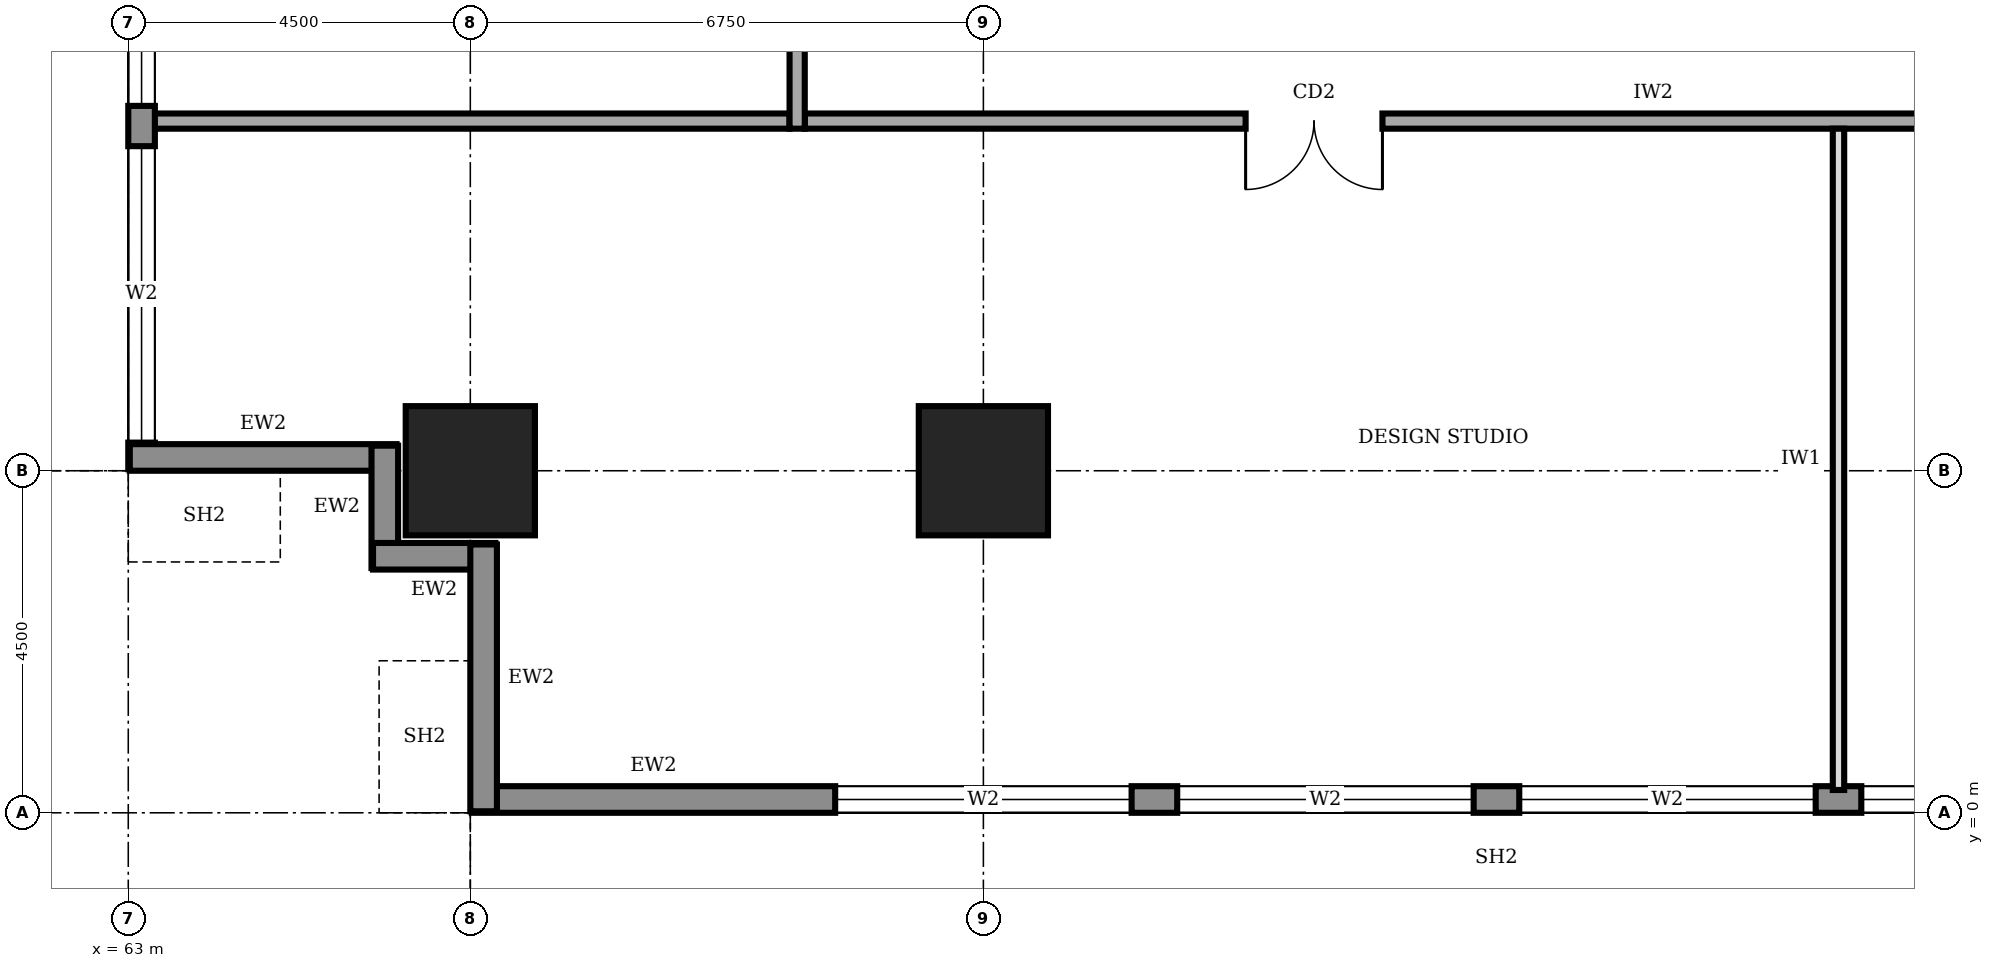
"""IFC4 building model, lengths in metres.
Left out: names, types, materials, properties, quantities, classifications, styles, units other than length and angle.
Written with IfcOpenShell. Run it as: python <this file> out.ifc"""

import sys

from ifc_helpers import new_model, si_unit, direction, frame, frame_2d, origin, origin_2d, place, context, subcontext, project, spatial, rectangle, extrude, element, fill, save


model = new_model("IFC4")
c1 = context("Model", 3, precision=1e-05, world=origin(), true_north=direction((0.0, 1.0)))
c2 = subcontext(c1, "Body", "Model", "MODEL_VIEW")
j1 = project(units=[si_unit("LENGTHUNIT", "METRE"), si_unit("PLANEANGLEUNIT", "RADIAN")], contexts=[c1])
p1 = place(None, origin())
s1 = spatial("IfcSite", under=j1, at=p1, CompositionType="ELEMENT")
p2 = place(p1, origin())
s2 = spatial("IfcBuilding", under=s1, at=p2, CompositionType="ELEMENT")
p3 = place(p2, frame((0.0, 0.0, 57.0)))
s3 = spatial("IfcBuildingStorey", under=s2, at=p3, CompositionType="ELEMENT", Elevation=57.0)
for number, where, z_axis, x_axis in (
    (1, (67.5, 4.5, 0.0), (0.0, 0.0, 1.0), (1.0, 0.0, 0.0)),
    (2, (74.25, 4.5, 0.0), (0.0, 0.0, 1.0), (1.0, 0.0, 0.0)),
):
    element("IfcColumn", number, at=place(p3, frame(where, z_axis=z_axis, x_axis=x_axis)), inside=s3, PredefinedType="COLUMN", context=c2, shape_type="SweptSolid", body=[
        extrude(rectangle(XDim=1.7, YDim=1.7, at=origin_2d()), origin(), (0.0, 0.0, 1.0), 4.0),
    ])
p4 = place(p3, frame((67.52, 0.175, 0.0), z_axis=(0.0, 0.0, 1.0), x_axis=(1.0, 0.0, 0.0)))
e3 = element("IfcWall", 3, at=p4, inside=s3, PredefinedType="STANDARD", context=c2, shape_type="SweptSolid", body=[
    extrude(rectangle(XDim=26.96, YDim=0.35, at=frame_2d((13.48, 0.0))), origin(), (0.0, 0.0, 1.0), 3.75),
])
p5 = place(p4, frame((4.78, 0.0, 0.6)))
e4 = element("IfcOpeningElement", 4, at=p5, cuts=e3, PredefinedType="OPENING", context=c2, shape_type="SweptSolid", body=[
    extrude(rectangle(XDim=3.9, YDim=2.6, at=frame_2d((1.95, 1.3))), frame((0.0, 0.185, 0.0), z_axis=(0.0, -1.0, 0.0), x_axis=(1.0, 0.0, 0.0)), (0.0, 0.0, 1.0), 0.37),
])
p6 = place(p4, frame((9.28, 0.0, 0.6)))
e5 = element("IfcOpeningElement", 5, at=p6, cuts=e3, PredefinedType="OPENING", context=c2, shape_type="SweptSolid", body=[
    extrude(rectangle(XDim=3.9, YDim=2.6, at=frame_2d((1.95, 1.3))), frame((0.0, 0.185, 0.0), z_axis=(0.0, -1.0, 0.0), x_axis=(1.0, 0.0, 0.0)), (0.0, 0.0, 1.0), 0.37),
])
p7 = place(p4, frame((13.78, 0.0, 0.6)))
e6 = element("IfcOpeningElement", 6, at=p7, cuts=e3, PredefinedType="OPENING", context=c2, shape_type="SweptSolid", body=[
    extrude(rectangle(XDim=3.9, YDim=2.6, at=frame_2d((1.95, 1.3))), frame((0.0, 0.185, 0.0), z_axis=(0.0, -1.0, 0.0), x_axis=(1.0, 0.0, 0.0)), (0.0, 0.0, 1.0), 0.37),
])
p8 = place(p4, frame((18.28, 0.0, 0.6)))
e7 = element("IfcOpeningElement", 7, at=p8, cuts=e3, PredefinedType="OPENING", context=c2, shape_type="SweptSolid", body=[
    extrude(rectangle(XDim=3.9, YDim=2.6, at=frame_2d((1.95, 1.3))), frame((0.0, 0.185, 0.0), z_axis=(0.0, -1.0, 0.0), x_axis=(1.0, 0.0, 0.0)), (0.0, 0.0, 1.0), 0.37),
])
p9 = place(p4, frame((22.71, 0.0, 0.6)))
e8 = element("IfcOpeningElement", 8, at=p9, cuts=e3, PredefinedType="OPENING", context=c2, shape_type="SweptSolid", body=[
    extrude(rectangle(XDim=3.9, YDim=2.6, at=frame_2d((1.95, 1.3))), frame((0.0, 0.185, 0.0), z_axis=(0.0, -1.0, 0.0), x_axis=(1.0, 0.0, 0.0)), (0.0, 0.0, 1.0), 0.37),
])
p10 = place(p3, frame((63.175, 35.98, 0.0), z_axis=(0.0, 0.0, 1.0), x_axis=(0.0, -1.0, 0.0)))
e9 = element("IfcWall", 9, at=p10, inside=s3, PredefinedType="STANDARD", context=c2, shape_type="SweptSolid", body=[
    extrude(rectangle(XDim=31.46, YDim=0.35, at=frame_2d((15.73, 0.0))), origin(), (0.0, 0.0, 1.0), 3.75),
])
p11 = place(p10, frame((27.21, 0.0, 0.6)))
e10 = element("IfcOpeningElement", 10, at=p11, cuts=e9, PredefinedType="OPENING", context=c2, shape_type="SweptSolid", body=[
    extrude(rectangle(XDim=3.9, YDim=2.6, at=frame_2d((1.95, 1.3))), frame((0.0, 0.185, 0.0), z_axis=(0.0, -1.0, 0.0), x_axis=(1.0, 0.0, 0.0)), (0.0, 0.0, 1.0), 0.37),
])
p12 = place(p10, frame((22.78, 0.0, 0.6)))
e11 = element("IfcOpeningElement", 11, at=p12, cuts=e9, PredefinedType="OPENING", context=c2, shape_type="SweptSolid", body=[
    extrude(rectangle(XDim=3.9, YDim=2.6, at=frame_2d((1.95, 1.3))), frame((0.0, 0.185, 0.0), z_axis=(0.0, -1.0, 0.0), x_axis=(1.0, 0.0, 0.0)), (0.0, 0.0, 1.0), 0.37),
])
p13 = place(p10, frame((18.28, 0.0, 0.6)))
e12 = element("IfcOpeningElement", 12, at=p13, cuts=e9, PredefinedType="OPENING", context=c2, shape_type="SweptSolid", body=[
    extrude(rectangle(XDim=3.9, YDim=2.6, at=frame_2d((1.95, 1.3))), frame((0.0, 0.185, 0.0), z_axis=(0.0, -1.0, 0.0), x_axis=(1.0, 0.0, 0.0)), (0.0, 0.0, 1.0), 0.37),
])
p14 = place(p10, frame((13.78, 0.0, 0.6)))
e13 = element("IfcOpeningElement", 13, at=p14, cuts=e9, PredefinedType="OPENING", context=c2, shape_type="SweptSolid", body=[
    extrude(rectangle(XDim=3.9, YDim=2.6, at=frame_2d((1.95, 1.3))), frame((0.0, 0.185, 0.0), z_axis=(0.0, -1.0, 0.0), x_axis=(1.0, 0.0, 0.0)), (0.0, 0.0, 1.0), 0.37),
])
p15 = place(p10, frame((9.28, 0.0, 0.6)))
e14 = element("IfcOpeningElement", 14, at=p15, cuts=e9, PredefinedType="OPENING", context=c2, shape_type="SweptSolid", body=[
    extrude(rectangle(XDim=3.9, YDim=2.6, at=frame_2d((1.95, 1.3))), frame((0.0, 0.185, 0.0), z_axis=(0.0, -1.0, 0.0), x_axis=(1.0, 0.0, 0.0)), (0.0, 0.0, 1.0), 0.37),
])
p16 = place(p10, frame((4.78, 0.0, 0.6)))
e15 = element("IfcOpeningElement", 15, at=p16, cuts=e9, PredefinedType="OPENING", context=c2, shape_type="SweptSolid", body=[
    extrude(rectangle(XDim=3.9, YDim=2.6, at=frame_2d((1.95, 1.3))), frame((0.0, 0.185, 0.0), z_axis=(0.0, -1.0, 0.0), x_axis=(1.0, 0.0, 0.0)), (0.0, 0.0, 1.0), 0.37),
])
p17 = place(p3, frame((63.02, 4.675, 0.0), z_axis=(0.0, 0.0, 1.0), x_axis=(1.0, 0.0, 0.0)))
e16 = element("IfcWall", 16, at=p17, inside=s3, PredefinedType="STANDARD", context=c2, shape_type="SweptSolid", body=[
    extrude(rectangle(XDim=3.51, YDim=0.35, at=frame_2d((1.755, 0.0))), origin(), (0.0, 0.0, 1.0), 2.85),
])
for number, where, z_axis, x_axis in (
    (17, (66.375, 4.83, 0.0), (0.0, 0.0, 1.0), (0.0, -1.0, 0.0)),
    (18, (66.22, 3.375, 0.0), (0.0, 0.0, 1.0), (1.0, 0.0, 0.0)),
):
    element("IfcWall", number, at=place(p3, frame(where, z_axis=z_axis, x_axis=x_axis)), inside=s3, PredefinedType="STANDARD", context=c2, shape_type="SweptSolid", body=[
        extrude(rectangle(XDim=1.61, YDim=0.35, at=frame_2d((0.805, 0.0))), origin(), (0.0, 0.0, 1.0), 3.75),
    ])
p18 = place(p3, frame((67.675, 3.53, 0.0), z_axis=(0.0, 0.0, 1.0), x_axis=(0.0, -1.0, 0.0)))
e19 = element("IfcWall", 19, at=p18, inside=s3, PredefinedType="STANDARD", context=c2, shape_type="SweptSolid", body=[
    extrude(rectangle(XDim=3.51, YDim=0.35, at=frame_2d((1.755, 0.0))), origin(), (0.0, 0.0, 1.0), 2.85),
])
p19 = place(p3, frame((71.9, 9.1, 0.0), z_axis=(0.0, 0.0, 1.0), x_axis=(1.0, 0.0, 0.0)))
e20 = element("IfcWall", 20, at=p19, inside=s3, PredefinedType="SOLIDWALL", context=c2, shape_type="SweptSolid", body=[
    extrude(rectangle(XDim=17.65, YDim=0.2, at=frame_2d((8.825, 0.0))), origin(), (0.0, 0.0, 1.0), 3.75),
])
p20 = place(p19, frame((5.8, 0.0, 0.0)))
e21 = element("IfcOpeningElement", 21, at=p20, cuts=e20, PredefinedType="OPENING", context=c2, shape_type="SweptSolid", body=[
    extrude(rectangle(XDim=1.8, YDim=2.1, at=frame_2d((0.9, 1.05))), frame((0.0, 0.11, 0.0), z_axis=(0.0, -1.0, 0.0), x_axis=(1.0, 0.0, 0.0)), (0.0, 0.0, 1.0), 0.22),
])
p21 = place(p19, frame((14.725, 0.0, 0.0)))
e22 = element("IfcOpeningElement", 22, at=p21, cuts=e20, PredefinedType="OPENING", context=c2, shape_type="SweptSolid", body=[
    extrude(rectangle(XDim=1.8, YDim=2.1, at=frame_2d((0.9, 1.05))), frame((0.0, 0.11, 0.0), z_axis=(0.0, -1.0, 0.0), x_axis=(1.0, 0.0, 0.0)), (0.0, 0.0, 1.0), 0.22),
])
p22 = place(p3, frame((71.8, 32.05, 0.0), z_axis=(0.0, 0.0, 1.0), x_axis=(0.0, -1.0, 0.0)))
e23 = element("IfcWall", 23, at=p22, inside=s3, PredefinedType="SOLIDWALL", context=c2, shape_type="SweptSolid", body=[
    extrude(rectangle(XDim=23.05, YDim=0.2, at=frame_2d((11.525, 0.0))), origin(), (0.0, 0.0, 1.0), 3.75),
])
p23 = place(p22, frame((18.05, 0.0, 0.0)))
e24 = element("IfcOpeningElement", 24, at=p23, cuts=e23, PredefinedType="OPENING", context=c2, shape_type="SweptSolid", body=[
    extrude(rectangle(XDim=1.0, YDim=2.1, at=frame_2d((0.5, 1.05))), frame((0.0, 0.11, 0.0), z_axis=(0.0, -1.0, 0.0), x_axis=(1.0, 0.0, 0.0)), (0.0, 0.0, 1.0), 0.22),
])
p24 = place(p22, frame((11.3, 0.0, 0.0)))
e25 = element("IfcOpeningElement", 25, at=p24, cuts=e23, PredefinedType="OPENING", context=c2, shape_type="SweptSolid", body=[
    extrude(rectangle(XDim=1.0, YDim=2.1, at=frame_2d((0.5, 1.05))), frame((0.0, 0.11, 0.0), z_axis=(0.0, -1.0, 0.0), x_axis=(1.0, 0.0, 0.0)), (0.0, 0.0, 1.0), 0.22),
])
p25 = place(p22, frame((4.175, 0.0, 0.0)))
e26 = element("IfcOpeningElement", 26, at=p25, cuts=e23, PredefinedType="OPENING", context=c2, shape_type="SweptSolid", body=[
    extrude(rectangle(XDim=1.0, YDim=2.1, at=frame_2d((0.5, 1.05))), frame((0.0, 0.11, 0.0), z_axis=(0.0, -1.0, 0.0), x_axis=(1.0, 0.0, 0.0)), (0.0, 0.0, 1.0), 0.22),
])
p26 = place(p3, frame((63.3, 9.1, 0.0), z_axis=(0.0, 0.0, 1.0), x_axis=(1.0, 0.0, 0.0)))
e27 = element("IfcWall", 27, at=p26, inside=s3, PredefinedType="SOLIDWALL", context=c2, shape_type="SweptSolid", body=[
    extrude(rectangle(XDim=8.4, YDim=0.2, at=frame_2d((4.2, 0.0))), origin(), (0.0, 0.0, 1.0), 3.75),
])
p27 = place(p3, frame((85.5, 0.3, 0.0), z_axis=(0.0, 0.0, 1.0), x_axis=(0.0, 1.0, 0.0)))
e28 = element("IfcWall", 28, at=p27, inside=s3, PredefinedType="PARTITIONING", context=c2, shape_type="SweptSolid", body=[
    extrude(rectangle(XDim=8.7, YDim=0.15, at=frame_2d((4.35, 0.0))), origin(), (0.0, 0.0, 1.0), 3.75),
])
p28 = place(p5, origin())
e29 = element("IfcWindow", 29, at=p28, inside=s3, PartitioningType="SINGLE_PANEL", PredefinedType="WINDOW", context=c2, shape_type="SweptSolid", body=[
    extrude(rectangle(XDim=3.9, YDim=2.6, at=frame_2d((1.95, 1.3))), frame((0.0, 0.03, 0.0), z_axis=(0.0, -1.0, 0.0), x_axis=(1.0, 0.0, 0.0)), (0.0, 0.0, 1.0), 0.06),
])
fill(e4, e29)
p29 = place(p6, origin())
e30 = element("IfcWindow", 30, at=p29, inside=s3, PartitioningType="SINGLE_PANEL", PredefinedType="WINDOW", context=c2, shape_type="SweptSolid", body=[
    extrude(rectangle(XDim=3.9, YDim=2.6, at=frame_2d((1.95, 1.3))), frame((0.0, 0.03, 0.0), z_axis=(0.0, -1.0, 0.0), x_axis=(1.0, 0.0, 0.0)), (0.0, 0.0, 1.0), 0.06),
])
fill(e5, e30)
p30 = place(p7, origin())
e31 = element("IfcWindow", 31, at=p30, inside=s3, PartitioningType="SINGLE_PANEL", PredefinedType="WINDOW", context=c2, shape_type="SweptSolid", body=[
    extrude(rectangle(XDim=3.9, YDim=2.6, at=frame_2d((1.95, 1.3))), frame((0.0, 0.03, 0.0), z_axis=(0.0, -1.0, 0.0), x_axis=(1.0, 0.0, 0.0)), (0.0, 0.0, 1.0), 0.06),
])
fill(e6, e31)
p31 = place(p8, origin())
e32 = element("IfcWindow", 32, at=p31, inside=s3, PartitioningType="SINGLE_PANEL", PredefinedType="WINDOW", context=c2, shape_type="SweptSolid", body=[
    extrude(rectangle(XDim=3.9, YDim=2.6, at=frame_2d((1.95, 1.3))), frame((0.0, 0.03, 0.0), z_axis=(0.0, -1.0, 0.0), x_axis=(1.0, 0.0, 0.0)), (0.0, 0.0, 1.0), 0.06),
])
fill(e7, e32)
p32 = place(p11, origin())
e33 = element("IfcWindow", 33, at=p32, inside=s3, PartitioningType="SINGLE_PANEL", PredefinedType="WINDOW", context=c2, shape_type="SweptSolid", body=[
    extrude(rectangle(XDim=3.9, YDim=2.6, at=frame_2d((1.95, 1.3))), frame((0.0, 0.03, 0.0), z_axis=(0.0, -1.0, 0.0), x_axis=(1.0, 0.0, 0.0)), (0.0, 0.0, 1.0), 0.06),
])
fill(e10, e33)
p33 = place(p12, origin())
e34 = element("IfcWindow", 34, at=p33, inside=s3, PartitioningType="SINGLE_PANEL", PredefinedType="WINDOW", context=c2, shape_type="SweptSolid", body=[
    extrude(rectangle(XDim=3.9, YDim=2.6, at=frame_2d((1.95, 1.3))), frame((0.0, 0.03, 0.0), z_axis=(0.0, -1.0, 0.0), x_axis=(1.0, 0.0, 0.0)), (0.0, 0.0, 1.0), 0.06),
])
fill(e11, e34)
p34 = place(p20, frame((1.8, 0.0, 0.0), z_axis=(0.0, 0.0, 1.0), x_axis=(-1.0, 0.0, 0.0)))
e35 = element("IfcDoor", 35, at=p34, inside=s3, OperationType="DOUBLE_DOOR_SINGLE_SWING", PredefinedType="DOOR", context=c2, shape_type="SweptSolid", body=[
    extrude(rectangle(XDim=1.8, YDim=2.1, at=frame_2d((0.9, 1.05))), frame((0.0, 0.025, 0.0), z_axis=(0.0, -1.0, 0.0), x_axis=(1.0, 0.0, 0.0)), (0.0, 0.0, 1.0), 0.05),
])
fill(e21, e35)
save(model, sys.argv[1])
